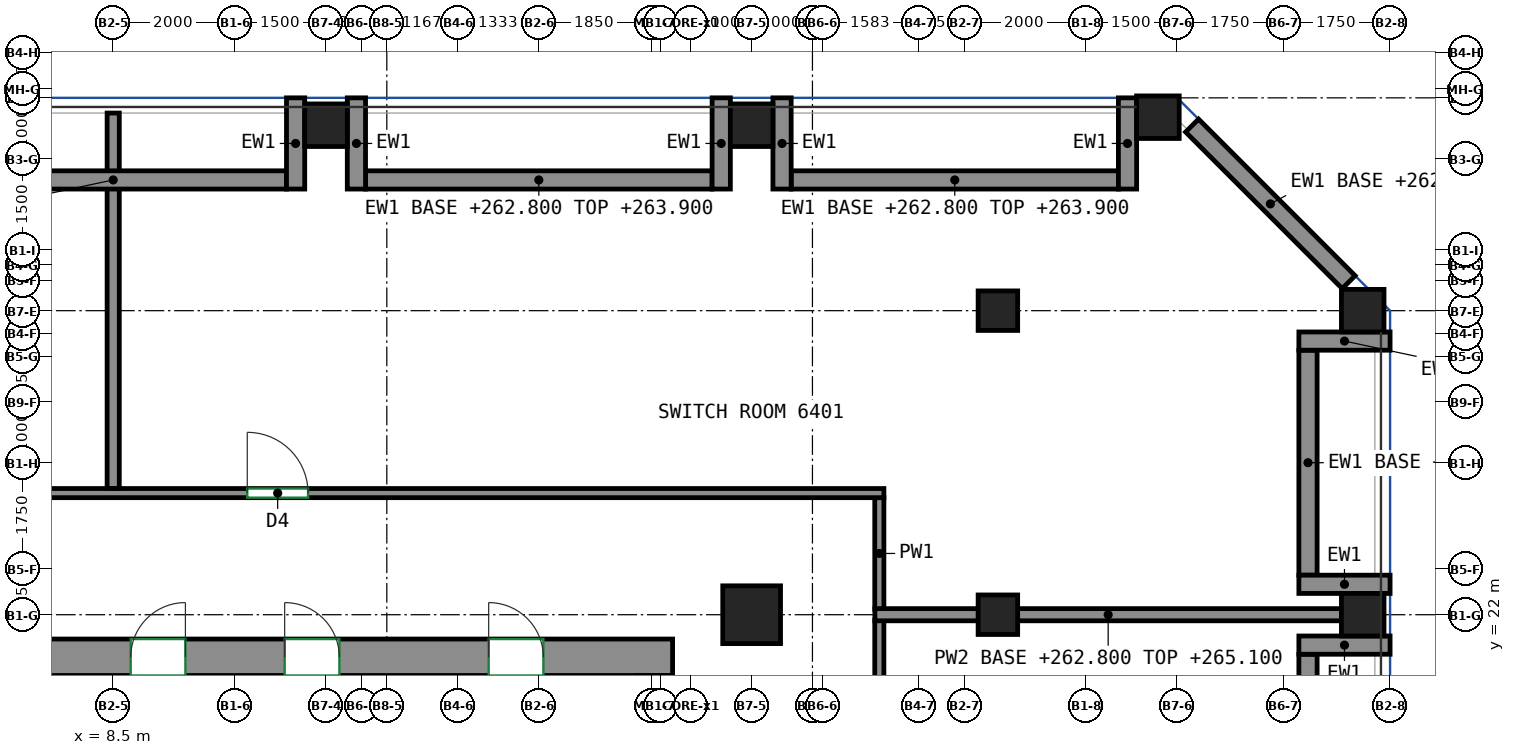
"""IFC4 building model, lengths in metres.
Left out: names, types, materials, properties, quantities, classifications, styles, units other than length and angle.
Written with IfcOpenShell. Run it as: python <this file> out.ifc"""

import sys

from ifc_helpers import new_model, si_unit, direction, frame, frame_2d, origin, origin_2d, place, context, subcontext, project, spatial, rectangle, extrude, source, transform, mapped, element, fill, save


model = new_model("IFC4")
c1 = context("Model", 3, precision=1e-05, world=origin(), true_north=direction((0.0, 1.0)))
c2 = subcontext(c1, "Body", "Model", "MODEL_VIEW")
j1 = project(units=[si_unit("LENGTHUNIT", "METRE"), si_unit("PLANEANGLEUNIT", "RADIAN")], contexts=[c1])
p1 = place(None, origin())
s1 = spatial("IfcSite", under=j1, at=p1, CompositionType="ELEMENT")
p2 = place(p1, origin())
s2 = spatial("IfcBuilding", under=s1, at=p2, CompositionType="ELEMENT")
p3 = place(p2, frame((0.0, 0.0, 262.8)))
s3 = spatial("IfcBuildingStorey", under=s2, at=p3, CompositionType="ELEMENT", Elevation=262.8)
m1 = source(origin(), c2, "Body", "SweptSolid", [
    extrude(rectangle(XDim=0.7, YDim=0.7, at=origin_2d()), origin(), (0.0, 0.0, 1.0), 2.3),
])
p4 = place(p3, frame((12.0, 30.05, 0.0), z_axis=(0.0, 0.0, 1.0), x_axis=(1.0, 0.0, 0.0)))
e1 = element("IfcColumn", 1, at=p4, inside=s3, PredefinedType="COLUMN", context=c2, shape_type="MappedRepresentation", body=[
    mapped(m1, transform((0.0, 0.0, 0.0))),
])
m2 = source(origin(), c2, "Body", "SweptSolid", [
    extrude(rectangle(XDim=0.95, YDim=0.95, at=origin_2d()), origin(), (0.0, 0.0, 1.0), 2.3),
])
p5 = place(p3, frame((19.0, 22.0, 0.0), z_axis=(0.0, 0.0, 1.0), x_axis=(1.0, 0.0, 0.0)))
e2 = element("IfcColumn", 2, at=p5, inside=s3, PredefinedType="COLUMN", context=c2, shape_type="MappedRepresentation", body=[
    mapped(m2, transform((0.0, 0.0, 0.0))),
])
for number, where, z_axis, x_axis in (
    (3, (19.0, 30.05, 0.0), (0.0, 0.0, 1.0), (1.0, 0.0, 0.0)),
    (4, (25.682, 30.182, 0.0), (0.0, 0.0, 1.0), (1.0, 0.0, 0.0)),
    (5, (29.05, 22.0, 0.0), (0.0, 0.0, 1.0), (1.0, 0.0, 0.0)),
):
    element("IfcColumn", number, at=place(p3, frame(where, z_axis=z_axis, x_axis=x_axis)), inside=s3, PredefinedType="COLUMN", context=c2, shape_type="MappedRepresentation", body=[
        mapped(m1, transform((0.0, 0.0, 0.0))),
    ])
m3 = source(origin(), c2, "Body", "SweptSolid", [
    extrude(rectangle(XDim=0.7, YDim=0.7, at=origin_2d()), origin(), (0.0, 0.0, 1.0), 3.8),
])
p6 = place(p3, frame((29.05, 27.0, 0.0), z_axis=(0.0, 0.0, 1.0), x_axis=(1.0, 0.0, 0.0)))
e6 = element("IfcColumn", 6, at=p6, inside=s3, PredefinedType="COLUMN", context=c2, shape_type="MappedRepresentation", body=[
    mapped(m3, transform((0.0, 0.0, 0.0))),
])
m4 = source(origin(), c2, "Body", "SweptSolid", [
    extrude(rectangle(XDim=0.65, YDim=0.65, at=origin_2d()), origin(), (0.0, 0.0, 1.0), 3.8),
])
for number, where, z_axis, x_axis in (
    (7, (23.05, 22.0, 0.0), (0.0, 0.0, 1.0), (1.0, 0.0, 0.0)),
    (8, (23.05, 27.0, 0.0), (0.0, 0.0, 1.0), (1.0, 0.0, 0.0)),
):
    element("IfcColumn", number, at=place(p3, frame(where, z_axis=z_axis, x_axis=x_axis)), inside=s3, PredefinedType="COLUMN", context=c2, shape_type="MappedRepresentation", body=[
        mapped(m4, transform((0.0, 0.0, 0.0))),
    ])
m5 = source(origin(), c2, "Body", "SweptSolid", [
    extrude(rectangle(XDim=33.3, YDim=0.6, at=frame_2d((16.65, 0.0))), origin(), (0.0, 0.0, 1.0), 3.8),
])
p7 = place(p3, frame((-15.6, 21.3, 0.0), z_axis=(0.0, 0.0, 1.0), x_axis=(1.0, 0.0, 0.0)))
e9 = element("IfcWall", 9, at=p7, inside=s3, PredefinedType="SHEAR", context=c2, shape_type="MappedRepresentation", body=[
    mapped(m5, transform((0.0, 0.0, 0.0))),
])
p8 = place(p7, frame((6.431, 0.0, 0.0)))
e10 = element("IfcOpeningElement", 10, at=p8, cuts=e9, PredefinedType="OPENING", context=c2, shape_type="SweptSolid", body=[
    extrude(rectangle(XDim=0.9, YDim=2.1, at=frame_2d((0.45, 1.05))), frame((0.0, 0.31, 0.0), z_axis=(0.0, -1.0, 0.0), x_axis=(1.0, 0.0, 0.0)), (0.0, 0.0, 1.0), 0.62),
])
p9 = place(p7, frame((11.738, 0.0, 0.0)))
e11 = element("IfcOpeningElement", 11, at=p9, cuts=e9, PredefinedType="OPENING", context=c2, shape_type="SweptSolid", body=[
    extrude(rectangle(XDim=0.9, YDim=2.1, at=frame_2d((0.45, 1.05))), frame((0.0, 0.31, 0.0), z_axis=(0.0, -1.0, 0.0), x_axis=(1.0, 0.0, 0.0)), (0.0, 0.0, 1.0), 0.62),
])
p10 = place(p7, frame((17.165, 0.0, 0.0)))
e12 = element("IfcOpeningElement", 12, at=p10, cuts=e9, PredefinedType="OPENING", context=c2, shape_type="SweptSolid", body=[
    extrude(rectangle(XDim=0.9, YDim=2.1, at=frame_2d((0.45, 1.05))), frame((0.0, 0.31, 0.0), z_axis=(0.0, -1.0, 0.0), x_axis=(1.0, 0.0, 0.0)), (0.0, 0.0, 1.0), 0.62),
])
p11 = place(p7, frame((21.386, 0.0, 0.0)))
e13 = element("IfcOpeningElement", 13, at=p11, cuts=e9, PredefinedType="OPENING", context=c2, shape_type="SweptSolid", body=[
    extrude(rectangle(XDim=0.9, YDim=2.1, at=frame_2d((0.45, 1.05))), frame((0.0, 0.31, 0.0), z_axis=(0.0, -1.0, 0.0), x_axis=(1.0, 0.0, 0.0)), (0.0, 0.0, 1.0), 0.62),
])
p12 = place(p7, frame((24.387, 0.0, 0.0)))
e14 = element("IfcOpeningElement", 14, at=p12, cuts=e9, PredefinedType="OPENING", context=c2, shape_type="SweptSolid", body=[
    extrude(rectangle(XDim=0.9, YDim=2.1, at=frame_2d((0.45, 1.05))), frame((0.0, 0.31, 0.0), z_axis=(0.0, -1.0, 0.0), x_axis=(1.0, 0.0, 0.0)), (0.0, 0.0, 1.0), 0.62),
])
p13 = place(p7, frame((26.92, 0.0, 0.0)))
e15 = element("IfcOpeningElement", 15, at=p13, cuts=e9, PredefinedType="OPENING", context=c2, shape_type="SweptSolid", body=[
    extrude(rectangle(XDim=0.9, YDim=2.1, at=frame_2d((0.45, 1.05))), frame((0.0, 0.31, 0.0), z_axis=(0.0, -1.0, 0.0), x_axis=(1.0, 0.0, 0.0)), (0.0, 0.0, 1.0), 0.62),
])
p14 = place(p7, frame((2.125, 0.0, 0.0)))
e16 = element("IfcOpeningElement", 16, at=p14, cuts=e9, PredefinedType="OPENING", context=c2, shape_type="SweptSolid", body=[
    extrude(rectangle(XDim=0.9, YDim=2.1, at=frame_2d((0.45, 1.05))), frame((0.0, 0.31, 0.0), z_axis=(0.0, -1.0, 0.0), x_axis=(1.0, 0.0, 0.0)), (0.0, 0.0, 1.0), 0.62),
])
p15 = place(p7, frame((30.275, 0.0, 0.0)))
e17 = element("IfcOpeningElement", 17, at=p15, cuts=e9, PredefinedType="OPENING", context=c2, shape_type="SweptSolid", body=[
    extrude(rectangle(XDim=0.9, YDim=2.1, at=frame_2d((0.45, 1.05))), frame((0.0, 0.31, 0.0), z_axis=(0.0, -1.0, 0.0), x_axis=(1.0, 0.0, 0.0)), (0.0, 0.0, 1.0), 0.62),
])
m6 = source(origin(), c2, "Body", "SweptSolid", [
    extrude(rectangle(XDim=12.7, YDim=0.3, at=frame_2d((6.35, 0.0))), origin(), (0.0, 0.0, 1.0), 1.1),
])
p16 = place(p3, frame((28.15, 8.65, 0.0), z_axis=(0.0, 0.0, 1.0), x_axis=(0.0, 1.0, 0.0)))
e18 = element("IfcWall", 18, at=p16, inside=s3, PredefinedType="SOLIDWALL", context=c2, shape_type="MappedRepresentation", body=[
    mapped(m6, transform((0.0, 0.0, 0.0))),
])
m7 = source(origin(), c2, "Body", "SweptSolid", [
    extrude(rectangle(XDim=1.5, YDim=0.3, at=frame_2d((0.75, 0.0))), origin(), (0.0, 0.0, 1.0), 2.3),
])
p17 = place(p3, frame((29.5, 21.5, 0.0), z_axis=(0.0, 0.0, 1.0), x_axis=(-1.0, 0.0, 0.0)))
e19 = element("IfcWall", 19, at=p17, inside=s3, PredefinedType="SOLIDWALL", context=c2, shape_type="MappedRepresentation", body=[
    mapped(m7, transform((0.0, 0.0, 0.0))),
])
m8 = source(origin(), c2, "Body", "SweptSolid", [
    extrude(rectangle(XDim=3.7, YDim=0.3, at=frame_2d((1.85, 0.0))), origin(), (0.0, 0.0, 1.0), 1.1),
])
p18 = place(p3, frame((28.15, 22.65, 0.0), z_axis=(0.0, 0.0, 1.0), x_axis=(0.0, 1.0, 0.0)))
e20 = element("IfcWall", 20, at=p18, inside=s3, PredefinedType="SOLIDWALL", context=c2, shape_type="MappedRepresentation", body=[
    mapped(m8, transform((0.0, 0.0, 0.0))),
])
p19 = place(p3, frame((29.5, 22.5, 0.0), z_axis=(0.0, 0.0, 1.0), x_axis=(-1.0, 0.0, 0.0)))
e21 = element("IfcWall", 21, at=p19, inside=s3, PredefinedType="SOLIDWALL", context=c2, shape_type="MappedRepresentation", body=[
    mapped(m7, transform((0.0, 0.0, 0.0))),
])
m9 = source(origin(), c2, "Body", "SweptSolid", [
    extrude(rectangle(XDim=1.5, YDim=0.3, at=frame_2d((0.75, 0.0))), origin(), (0.0, 0.0, 1.0), 3.8),
])
p20 = place(p3, frame((29.5, 26.5, 0.0), z_axis=(0.0, 0.0, 1.0), x_axis=(-1.0, 0.0, 0.0)))
e22 = element("IfcWall", 22, at=p20, inside=s3, PredefinedType="SOLIDWALL", context=c2, shape_type="MappedRepresentation", body=[
    mapped(m9, transform((0.0, 0.0, 0.0))),
])
m10 = source(origin(), c2, "Body", "SweptSolid", [
    extrude(rectangle(XDim=3.642, YDim=0.3, at=frame_2d((1.821, 0.0))), origin(), (0.0, 0.0, 1.0), 3.8),
])
p21 = place(p3, frame((28.819, 27.469, 0.0), z_axis=(0.0, 0.0, 1.0), x_axis=(-0.707106781187, 0.707106781187, 0.0)))
e23 = element("IfcWall", 23, at=p21, inside=s3, PredefinedType="SOLIDWALL", context=c2, shape_type="MappedRepresentation", body=[
    mapped(m10, transform((0.0, 0.0, 0.0))),
])
m11 = source(origin(), c2, "Body", "SweptSolid", [
    extrude(rectangle(XDim=5.382, YDim=0.3, at=frame_2d((2.691, 0.0))), origin(), (0.0, 0.0, 1.0), 1.1),
])
p22 = place(p3, frame((25.032, 29.15, 0.0), z_axis=(0.0, 0.0, 1.0), x_axis=(-1.0, 0.0, 0.0)))
e24 = element("IfcWall", 24, at=p22, inside=s3, PredefinedType="SOLIDWALL", context=c2, shape_type="MappedRepresentation", body=[
    mapped(m11, transform((0.0, 0.0, 0.0))),
])
for number, where, z_axis, x_axis in (
    (25, (25.182, 30.5, 0.0), (0.0, 0.0, 1.0), (0.0, -1.0, 0.0)),
    (26, (19.5, 30.5, 0.0), (0.0, 0.0, 1.0), (0.0, -1.0, 0.0)),
):
    element("IfcWall", number, at=place(p3, frame(where, z_axis=z_axis, x_axis=x_axis)), inside=s3, PredefinedType="SOLIDWALL", context=c2, shape_type="MappedRepresentation", body=[
        mapped(m7, transform((0.0, 0.0, 0.0))),
    ])
m12 = source(origin(), c2, "Body", "SweptSolid", [
    extrude(rectangle(XDim=5.7, YDim=0.3, at=frame_2d((2.85, 0.0))), origin(), (0.0, 0.0, 1.0), 1.1),
])
p23 = place(p3, frame((18.35, 29.15, 0.0), z_axis=(0.0, 0.0, 1.0), x_axis=(-1.0, 0.0, 0.0)))
e27 = element("IfcWall", 27, at=p23, inside=s3, PredefinedType="SOLIDWALL", context=c2, shape_type="MappedRepresentation", body=[
    mapped(m12, transform((0.0, 0.0, 0.0))),
])
for number, where, z_axis, x_axis in (
    (28, (18.5, 30.5, 0.0), (0.0, 0.0, 1.0), (0.0, -1.0, 0.0)),
    (29, (12.5, 30.5, 0.0), (0.0, 0.0, 1.0), (0.0, -1.0, 0.0)),
):
    element("IfcWall", number, at=place(p3, frame(where, z_axis=z_axis, x_axis=x_axis)), inside=s3, PredefinedType="SOLIDWALL", context=c2, shape_type="MappedRepresentation", body=[
        mapped(m7, transform((0.0, 0.0, 0.0))),
    ])
p24 = place(p3, frame((11.35, 29.15, 0.0), z_axis=(0.0, 0.0, 1.0), x_axis=(-1.0, 0.0, 0.0)))
e30 = element("IfcWall", 30, at=p24, inside=s3, PredefinedType="SOLIDWALL", context=c2, shape_type="MappedRepresentation", body=[
    mapped(m12, transform((0.0, 0.0, 0.0))),
])
p25 = place(p3, frame((11.5, 30.5, 0.0), z_axis=(0.0, 0.0, 1.0), x_axis=(0.0, -1.0, 0.0)))
e31 = element("IfcWall", 31, at=p25, inside=s3, PredefinedType="SOLIDWALL", context=c2, shape_type="MappedRepresentation", body=[
    mapped(m7, transform((0.0, 0.0, 0.0))),
])
p26 = place(p3, frame((21.1, 3.875, 0.0), z_axis=(0.0, 0.0, 1.0), x_axis=(0.0, 1.0, 0.0)))
e32 = element("IfcWall", 32, at=p26, inside=s3, PredefinedType="PARTITIONING", context=c2, shape_type="SweptSolid", body=[
    extrude(rectangle(XDim=18.035, YDim=0.15, at=frame_2d((9.018, 0.0))), origin(), (0.0, 0.0, 1.0), 3.8),
])
p27 = place(p26, frame((7.014, 0.0, 0.0)))
e33 = element("IfcOpeningElement", 33, at=p27, cuts=e32, PredefinedType="OPENING", context=c2, shape_type="SweptSolid", body=[
    extrude(rectangle(XDim=1.0, YDim=2.1, at=frame_2d((0.5, 1.05))), frame((0.0, 0.085, 0.0), z_axis=(0.0, -1.0, 0.0), x_axis=(1.0, 0.0, 0.0)), (0.0, 0.0, 1.0), 0.17),
])
p28 = place(p3, frame((21.1, 22.09, 0.0), z_axis=(0.0, 0.0, 1.0), x_axis=(0.0, 1.0, 0.0)))
e34 = element("IfcWall", 34, at=p28, inside=s3, PredefinedType="PARTITIONING", context=c2, shape_type="SweptSolid", body=[
    extrude(rectangle(XDim=1.835, YDim=0.15, at=frame_2d((0.917, 0.0))), origin(), (0.0, 0.0, 1.0), 3.8),
])
p29 = place(p3, frame((-18.075, 24.0, 0.0), z_axis=(0.0, 0.0, 1.0), x_axis=(1.0, 0.0, 0.0)))
e35 = element("IfcWall", 35, at=p29, inside=s3, PredefinedType="PARTITIONING", context=c2, shape_type="SweptSolid", body=[
    extrude(rectangle(XDim=39.25, YDim=0.15, at=frame_2d((19.625, 0.0))), origin(), (0.0, 0.0, 1.0), 3.8),
])
p30 = place(p29, frame((0.402, 0.0, 0.0)))
e36 = element("IfcOpeningElement", 36, at=p30, cuts=e35, PredefinedType="OPENING", context=c2, shape_type="SweptSolid", body=[
    extrude(rectangle(XDim=0.9, YDim=2.1, at=frame_2d((0.45, 1.05))), frame((0.0, 0.085, 0.0), z_axis=(0.0, -1.0, 0.0), x_axis=(1.0, 0.0, 0.0)), (0.0, 0.0, 1.0), 0.17),
])
p31 = place(p29, frame((17.075, 0.0, 0.0)))
e37 = element("IfcOpeningElement", 37, at=p31, cuts=e35, PredefinedType="OPENING", context=c2, shape_type="SweptSolid", body=[
    extrude(rectangle(XDim=1.0, YDim=2.1, at=frame_2d((0.5, 1.05))), frame((0.0, 0.085, 0.0), z_axis=(0.0, -1.0, 0.0), x_axis=(1.0, 0.0, 0.0)), (0.0, 0.0, 1.0), 0.17),
])
p32 = place(p29, frame((28.78, 0.0, 0.0)))
e38 = element("IfcOpeningElement", 38, at=p32, cuts=e35, PredefinedType="OPENING", context=c2, shape_type="SweptSolid", body=[
    extrude(rectangle(XDim=1.0, YDim=2.1, at=frame_2d((0.5, 1.05))), frame((0.0, 0.085, 0.0), z_axis=(0.0, -1.0, 0.0), x_axis=(1.0, 0.0, 0.0)), (0.0, 0.0, 1.0), 0.17),
])
p33 = place(p3, frame((21.027, 22.0, 0.0), z_axis=(0.0, 0.0, 1.0), x_axis=(1.0, 0.0, 0.0)))
e39 = element("IfcWall", 39, at=p33, inside=s3, PredefinedType="PARTITIONING", context=c2, shape_type="SweptSolid", body=[
    extrude(rectangle(XDim=7.673, YDim=0.2, at=frame_2d((3.836, 0.0))), origin(), (0.0, 0.0, 1.0), 2.3),
])
p34 = place(p3, frame((8.5, 24.077, 0.0), z_axis=(0.0, 0.0, 1.0), x_axis=(0.0, 1.0, 0.0)))
e40 = element("IfcWall", 40, at=p34, inside=s3, PredefinedType="PARTITIONING", context=c2, shape_type="SweptSolid", body=[
    extrude(rectangle(XDim=4.953, YDim=0.2, at=frame_2d((2.477, 0.0))), origin(), (0.0, 0.0, 1.0), 3.8),
])
p35 = place(p3, frame((8.5, 29.27, 0.0), z_axis=(0.0, 0.0, 1.0), x_axis=(0.0, 1.0, 0.0)))
e41 = element("IfcWall", 41, at=p35, inside=s3, PredefinedType="PARTITIONING", context=c2, shape_type="SweptSolid", body=[
    extrude(rectangle(XDim=0.98, YDim=0.2, at=frame_2d((0.49, 0.0))), origin(), (0.0, 0.0, 1.0), 3.8),
])
p36 = place(p12, origin())
e42 = element("IfcDoor", 42, at=p36, inside=s3, OperationType="SINGLE_SWING_RIGHT", PredefinedType="DOOR", context=c2, shape_type="SweptSolid", body=[
    extrude(rectangle(XDim=0.9, YDim=2.1, at=frame_2d((0.45, 1.05))), frame((0.0, -0.155, 0.0), z_axis=(0.0, -1.0, 0.0), x_axis=(1.0, 0.0, 0.0)), (0.0, 0.0, 1.0), 0.05),
])
fill(e14, e42)
p37 = place(p13, origin())
e43 = element("IfcDoor", 43, at=p37, inside=s3, OperationType="SINGLE_SWING_LEFT", PredefinedType="DOOR", context=c2, shape_type="SweptSolid", body=[
    extrude(rectangle(XDim=0.9, YDim=2.1, at=frame_2d((0.45, 1.05))), frame((0.0, -0.155, 0.0), z_axis=(0.0, -1.0, 0.0), x_axis=(1.0, 0.0, 0.0)), (0.0, 0.0, 1.0), 0.05),
])
fill(e15, e43)
p38 = place(p15, origin())
e44 = element("IfcDoor", 44, at=p38, inside=s3, OperationType="SINGLE_SWING_LEFT", PredefinedType="DOOR", context=c2, shape_type="SweptSolid", body=[
    extrude(rectangle(XDim=0.9, YDim=2.1, at=frame_2d((0.45, 1.05))), frame((0.0, -0.155, 0.0), z_axis=(0.0, -1.0, 0.0), x_axis=(1.0, 0.0, 0.0)), (0.0, 0.0, 1.0), 0.05),
])
fill(e17, e44)
p39 = place(p32, origin())
e45 = element("IfcDoor", 45, at=p39, inside=s3, OperationType="SINGLE_SWING_LEFT", PredefinedType="DOOR", context=c2, shape_type="SweptSolid", body=[
    extrude(rectangle(XDim=1.0, YDim=2.1, at=frame_2d((0.5, 1.05))), frame((0.0, 0.025, 0.0), z_axis=(0.0, -1.0, 0.0), x_axis=(1.0, 0.0, 0.0)), (0.0, 0.0, 1.0), 0.05),
])
fill(e38, e45)
save(model, sys.argv[1])
